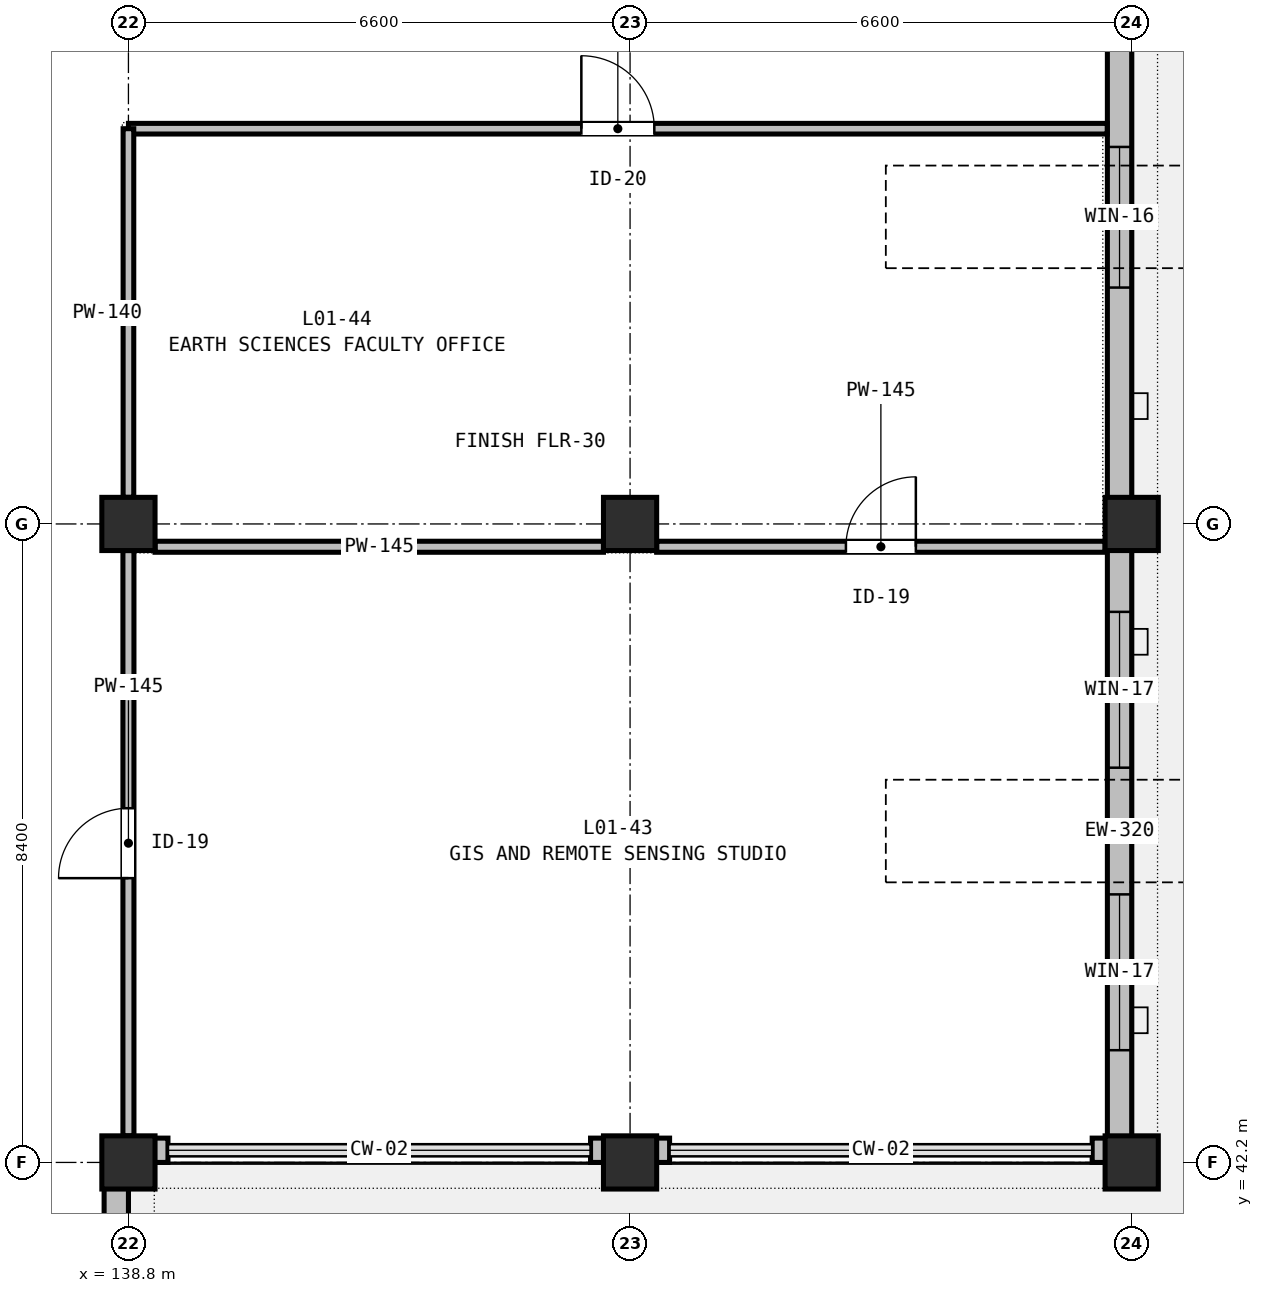
"""IFC4 building model, lengths in metres.
Left out: names, types, materials, properties, quantities, classifications, styles, units other than length and angle.
Written with IfcOpenShell. Run it as: python <this file> out.ifc"""

import sys

from ifc_helpers import new_model, si_unit, direction, frame, frame_2d, origin, origin_2d, place, context, subcontext, project, spatial, rectangle, extrude, element, fill, save


model = new_model("IFC4")
c1 = context("Model", 3, precision=1e-05, world=origin(), true_north=direction((0.0, 1.0)))
c2 = subcontext(c1, "Body", "Model", "MODEL_VIEW")
j1 = project(units=[si_unit("LENGTHUNIT", "METRE"), si_unit("PLANEANGLEUNIT", "RADIAN")], contexts=[c1])
p1 = place(None, origin())
s1 = spatial("IfcSite", under=j1, at=p1, CompositionType="ELEMENT")
p2 = place(p1, origin())
s2 = spatial("IfcBuilding", under=s1, at=p2, CompositionType="ELEMENT")
p3 = place(p2, frame((0.0, 0.0, 5.4)))
s3 = spatial("IfcBuildingStorey", under=s2, at=p3, CompositionType="ELEMENT", Elevation=5.4)
for number, where, z_axis, x_axis in (
    (1, (138.8, 42.2, 0.0), (0.0, 0.0, 1.0), (1.0, 0.0, 0.0)),
    (2, (138.8, 50.6, 0.0), (0.0, 0.0, 1.0), (1.0, 0.0, 0.0)),
    (3, (145.4, 42.2, 0.0), (0.0, 0.0, 1.0), (1.0, 0.0, 0.0)),
    (4, (145.4, 50.6, 0.0), (0.0, 0.0, 1.0), (1.0, 0.0, 0.0)),
    (5, (152.0, 42.2, 0.0), (0.0, 0.0, 1.0), (1.0, 0.0, 0.0)),
    (6, (152.0, 50.6, 0.0), (0.0, 0.0, 1.0), (1.0, 0.0, 0.0)),
):
    element("IfcColumn", number, at=place(p3, frame(where, z_axis=z_axis, x_axis=x_axis)), inside=s3, PredefinedType="COLUMN", context=c2, shape_type="SweptSolid", body=[
        extrude(rectangle(XDim=0.7, YDim=0.7, at=origin_2d()), origin(), (0.0, 0.0, 1.0), 4.8),
    ])
p4 = place(p3, frame((151.84, 58.68, 0.0), z_axis=(0.0, 0.0, 1.0), x_axis=(0.0, -1.0, 0.0)))
e7 = element("IfcWall", 7, at=p4, inside=s3, PredefinedType="STANDARD", context=c2, shape_type="SweptSolid", body=[
    extrude(rectangle(XDim=8.08, YDim=0.32, at=frame_2d((4.04, 0.0))), origin(), (0.0, 0.0, 1.0), 4.085),
])
p5 = place(p4, frame((3.12, 0.0, 0.9)))
e8 = element("IfcOpeningElement", 8, at=p5, cuts=e7, PredefinedType="OPENING", context=c2, shape_type="SweptSolid", body=[
    extrude(rectangle(XDim=1.85, YDim=1.6, at=frame_2d((0.925, 0.8))), frame((0.0, 0.17, 0.0), z_axis=(0.0, -1.0, 0.0), x_axis=(1.0, 0.0, 0.0)), (0.0, 0.0, 1.0), 0.34),
])
p6 = place(p3, frame((151.84, 50.6, 0.0), z_axis=(0.0, 0.0, 1.0), x_axis=(0.0, -1.0, 0.0)))
e9 = element("IfcWall", 9, at=p6, inside=s3, PredefinedType="STANDARD", context=c2, shape_type="SweptSolid", body=[
    extrude(rectangle(XDim=8.08, YDim=0.32, at=frame_2d((4.04, 0.0))), origin(), (0.0, 0.0, 1.0), 4.085),
])
p7 = place(p6, frame((1.156, 0.0, 0.9)))
e10 = element("IfcOpeningElement", 10, at=p7, cuts=e9, PredefinedType="OPENING", context=c2, shape_type="SweptSolid", body=[
    extrude(rectangle(XDim=2.05, YDim=1.65, at=frame_2d((1.025, 0.825))), frame((0.0, 0.17, 0.0), z_axis=(0.0, -1.0, 0.0), x_axis=(1.0, 0.0, 0.0)), (0.0, 0.0, 1.0), 0.34),
])
p8 = place(p6, frame((4.873, 0.0, 0.9)))
e11 = element("IfcOpeningElement", 11, at=p8, cuts=e9, PredefinedType="OPENING", context=c2, shape_type="SweptSolid", body=[
    extrude(rectangle(XDim=2.05, YDim=1.65, at=frame_2d((1.025, 0.825))), frame((0.0, 0.17, 0.0), z_axis=(0.0, -1.0, 0.0), x_axis=(1.0, 0.0, 0.0)), (0.0, 0.0, 1.0), 0.34),
])
for number, where, z_axis, x_axis in (
    (12, (152.0, 42.36, 0.0), (0.0, 0.0, 1.0), (-1.0, 0.0, 0.0)),
    (13, (145.92, 42.36, 0.0), (0.0, 0.0, 1.0), (-1.0, 0.0, 0.0)),
    (14, (145.4, 42.36, 0.0), (0.0, 0.0, 1.0), (-1.0, 0.0, 0.0)),
    (15, (139.32, 42.36, 0.0), (0.0, 0.0, 1.0), (-1.0, 0.0, 0.0)),
):
    element("IfcWall", number, at=place(p3, frame(where, z_axis=z_axis, x_axis=x_axis)), inside=s3, PredefinedType="STANDARD", context=c2, shape_type="SweptSolid", body=[
        extrude(rectangle(XDim=0.52, YDim=0.32, at=frame_2d((0.26, 0.0))), origin(), (0.0, 0.0, 1.0), 3.935),
    ])
p9 = place(p3, frame((138.64, 41.88, 0.0), z_axis=(0.0, 0.0, 1.0), x_axis=(0.0, -1.0, 0.0)))
e16 = element("IfcWall", 16, at=p9, inside=s3, PredefinedType="STANDARD", context=c2, shape_type="SweptSolid", body=[
    extrude(rectangle(XDim=8.08, YDim=0.32, at=frame_2d((4.04, 0.0))), origin(), (0.0, 0.0, 1.0), 4.085),
])
p10 = place(p9, frame((1.007, 0.0, 0.9)))
e17 = element("IfcOpeningElement", 17, at=p10, cuts=e16, PredefinedType="OPENING", context=c2, shape_type="SweptSolid", body=[
    extrude(rectangle(XDim=2.35, YDim=1.5, at=frame_2d((1.175, 0.75))), frame((0.0, 0.17, 0.0), z_axis=(0.0, -1.0, 0.0), x_axis=(1.0, 0.0, 0.0)), (0.0, 0.0, 1.0), 0.34),
])
p11 = place(p9, frame((4.723, 0.0, 0.9)))
e18 = element("IfcOpeningElement", 18, at=p11, cuts=e16, PredefinedType="OPENING", context=c2, shape_type="SweptSolid", body=[
    extrude(rectangle(XDim=2.35, YDim=1.5, at=frame_2d((1.175, 0.75))), frame((0.0, 0.17, 0.0), z_axis=(0.0, -1.0, 0.0), x_axis=(1.0, 0.0, 0.0)), (0.0, 0.0, 1.0), 0.34),
])
p12 = place(p3, frame((138.8, 42.55, 0.0), z_axis=(0.0, 0.0, 1.0), x_axis=(0.0, 1.0, 0.0)))
e19 = element("IfcWall", 19, at=p12, inside=s3, PredefinedType="PARTITIONING", context=c2, shape_type="SweptSolid", body=[
    extrude(rectangle(XDim=7.7, YDim=0.145, at=frame_2d((3.85, 0.0))), origin(), (0.0, 0.0, 1.0), 3.935),
])
p13 = place(p12, frame((3.39, 0.0, 0.0)))
e20 = element("IfcOpeningElement", 20, at=p13, cuts=e19, PredefinedType="OPENING", context=c2, shape_type="SweptSolid", body=[
    extrude(rectangle(XDim=0.92, YDim=2.14, at=frame_2d((0.46, 1.07))), frame((0.0, 0.083, 0.0), z_axis=(0.0, -1.0, 0.0), x_axis=(1.0, 0.0, 0.0)), (0.0, 0.0, 1.0), 0.165),
])
p14 = place(p3, frame((139.15, 50.3, 0.0), z_axis=(0.0, 0.0, 1.0), x_axis=(1.0, 0.0, 0.0)))
e21 = element("IfcWall", 21, at=p14, inside=s3, PredefinedType="PARTITIONING", context=c2, shape_type="SweptSolid", body=[
    extrude(rectangle(XDim=5.9, YDim=0.145, at=frame_2d((2.95, 0.0))), origin(), (0.0, 0.0, 1.0), 3.935),
])
p15 = place(p3, frame((145.75, 50.3, 0.0), z_axis=(0.0, 0.0, 1.0), x_axis=(1.0, 0.0, 0.0)))
e22 = element("IfcWall", 22, at=p15, inside=s3, PredefinedType="PARTITIONING", context=c2, shape_type="SweptSolid", body=[
    extrude(rectangle(XDim=5.9, YDim=0.145, at=frame_2d((2.95, 0.0))), origin(), (0.0, 0.0, 1.0), 3.935),
])
p16 = place(p15, frame((2.49, 0.0, 0.0)))
e23 = element("IfcOpeningElement", 23, at=p16, cuts=e22, PredefinedType="OPENING", context=c2, shape_type="SweptSolid", body=[
    extrude(rectangle(XDim=0.92, YDim=2.14, at=frame_2d((0.46, 1.07))), frame((0.0, 0.083, 0.0), z_axis=(0.0, -1.0, 0.0), x_axis=(1.0, 0.0, 0.0)), (0.0, 0.0, 1.0), 0.165),
])
p17 = place(p3, frame((138.8, 55.8, 0.0), z_axis=(0.0, 0.0, 1.0), x_axis=(1.0, 0.0, 0.0)))
e24 = element("IfcWall", 24, at=p17, inside=s3, PredefinedType="PARTITIONING", context=c2, shape_type="SweptSolid", body=[
    extrude(rectangle(XDim=12.878, YDim=0.14, at=frame_2d((6.439, 0.0))), origin(), (0.0, 0.0, 1.0), 3.935),
])
p18 = place(p17, frame((5.959, 0.0, 0.0)))
e25 = element("IfcOpeningElement", 25, at=p18, cuts=e24, PredefinedType="OPENING", context=c2, shape_type="SweptSolid", body=[
    extrude(rectangle(XDim=0.96, YDim=2.14, at=frame_2d((0.48, 1.07))), frame((0.0, 0.08, 0.0), z_axis=(0.0, -1.0, 0.0), x_axis=(1.0, 0.0, 0.0)), (0.0, 0.0, 1.0), 0.16),
])
p19 = place(p3, frame((138.8, 50.95, 0.0), z_axis=(0.0, 0.0, 1.0), x_axis=(0.0, 1.0, 0.0)))
e26 = element("IfcWall", 26, at=p19, inside=s3, PredefinedType="PARTITIONING", context=c2, shape_type="SweptSolid", body=[
    extrude(rectangle(XDim=4.85, YDim=0.14, at=frame_2d((2.425, 0.0))), origin(), (0.0, 0.0, 1.0), 3.935),
])
p20 = place(p5, origin())
e27 = element("IfcWindow", 27, at=p20, inside=s3, PartitioningType="SINGLE_PANEL", PredefinedType="WINDOW", context=c2, shape_type="SweptSolid", body=[
    extrude(rectangle(XDim=1.85, YDim=1.6, at=frame_2d((0.925, 0.8))), frame((0.0, 0.03, 0.0), z_axis=(0.0, -1.0, 0.0), x_axis=(1.0, 0.0, 0.0)), (0.0, 0.0, 1.0), 0.06),
])
fill(e8, e27)
p21 = place(p7, origin())
e28 = element("IfcWindow", 28, at=p21, inside=s3, PartitioningType="SINGLE_PANEL", PredefinedType="WINDOW", context=c2, shape_type="SweptSolid", body=[
    extrude(rectangle(XDim=2.05, YDim=1.65, at=frame_2d((1.025, 0.825))), frame((0.0, 0.03, 0.0), z_axis=(0.0, -1.0, 0.0), x_axis=(1.0, 0.0, 0.0)), (0.0, 0.0, 1.0), 0.06),
])
fill(e10, e28)
p22 = place(p8, origin())
e29 = element("IfcWindow", 29, at=p22, inside=s3, PartitioningType="SINGLE_PANEL", PredefinedType="WINDOW", context=c2, shape_type="SweptSolid", body=[
    extrude(rectangle(XDim=2.05, YDim=1.65, at=frame_2d((1.025, 0.825))), frame((0.0, 0.03, 0.0), z_axis=(0.0, -1.0, 0.0), x_axis=(1.0, 0.0, 0.0)), (0.0, 0.0, 1.0), 0.06),
])
fill(e11, e29)
p23 = place(p13, origin())
e30 = element("IfcDoor", 30, at=p23, inside=s3, OperationType="SINGLE_SWING_LEFT", PredefinedType="DOOR", context=c2, shape_type="SweptSolid", body=[
    extrude(rectangle(XDim=0.92, YDim=2.14, at=frame_2d((0.46, 1.07))), frame((0.0, 0.025, 0.0), z_axis=(0.0, -1.0, 0.0), x_axis=(1.0, 0.0, 0.0)), (0.0, 0.0, 1.0), 0.05),
])
fill(e20, e30)
p24 = place(p16, origin())
e31 = element("IfcDoor", 31, at=p24, inside=s3, OperationType="SINGLE_SWING_RIGHT", PredefinedType="DOOR", context=c2, shape_type="SweptSolid", body=[
    extrude(rectangle(XDim=0.92, YDim=2.14, at=frame_2d((0.46, 1.07))), frame((0.0, 0.025, 0.0), z_axis=(0.0, -1.0, 0.0), x_axis=(1.0, 0.0, 0.0)), (0.0, 0.0, 1.0), 0.05),
])
fill(e23, e31)
p25 = place(p18, origin())
e32 = element("IfcDoor", 32, at=p25, inside=s3, OperationType="SINGLE_SWING_LEFT", PredefinedType="DOOR", context=c2, shape_type="SweptSolid", body=[
    extrude(rectangle(XDim=0.96, YDim=2.14, at=frame_2d((0.48, 1.07))), frame((0.0, 0.025, 0.0), z_axis=(0.0, -1.0, 0.0), x_axis=(1.0, 0.0, 0.0)), (0.0, 0.0, 1.0), 0.05),
])
fill(e25, e32)
save(model, sys.argv[1])
